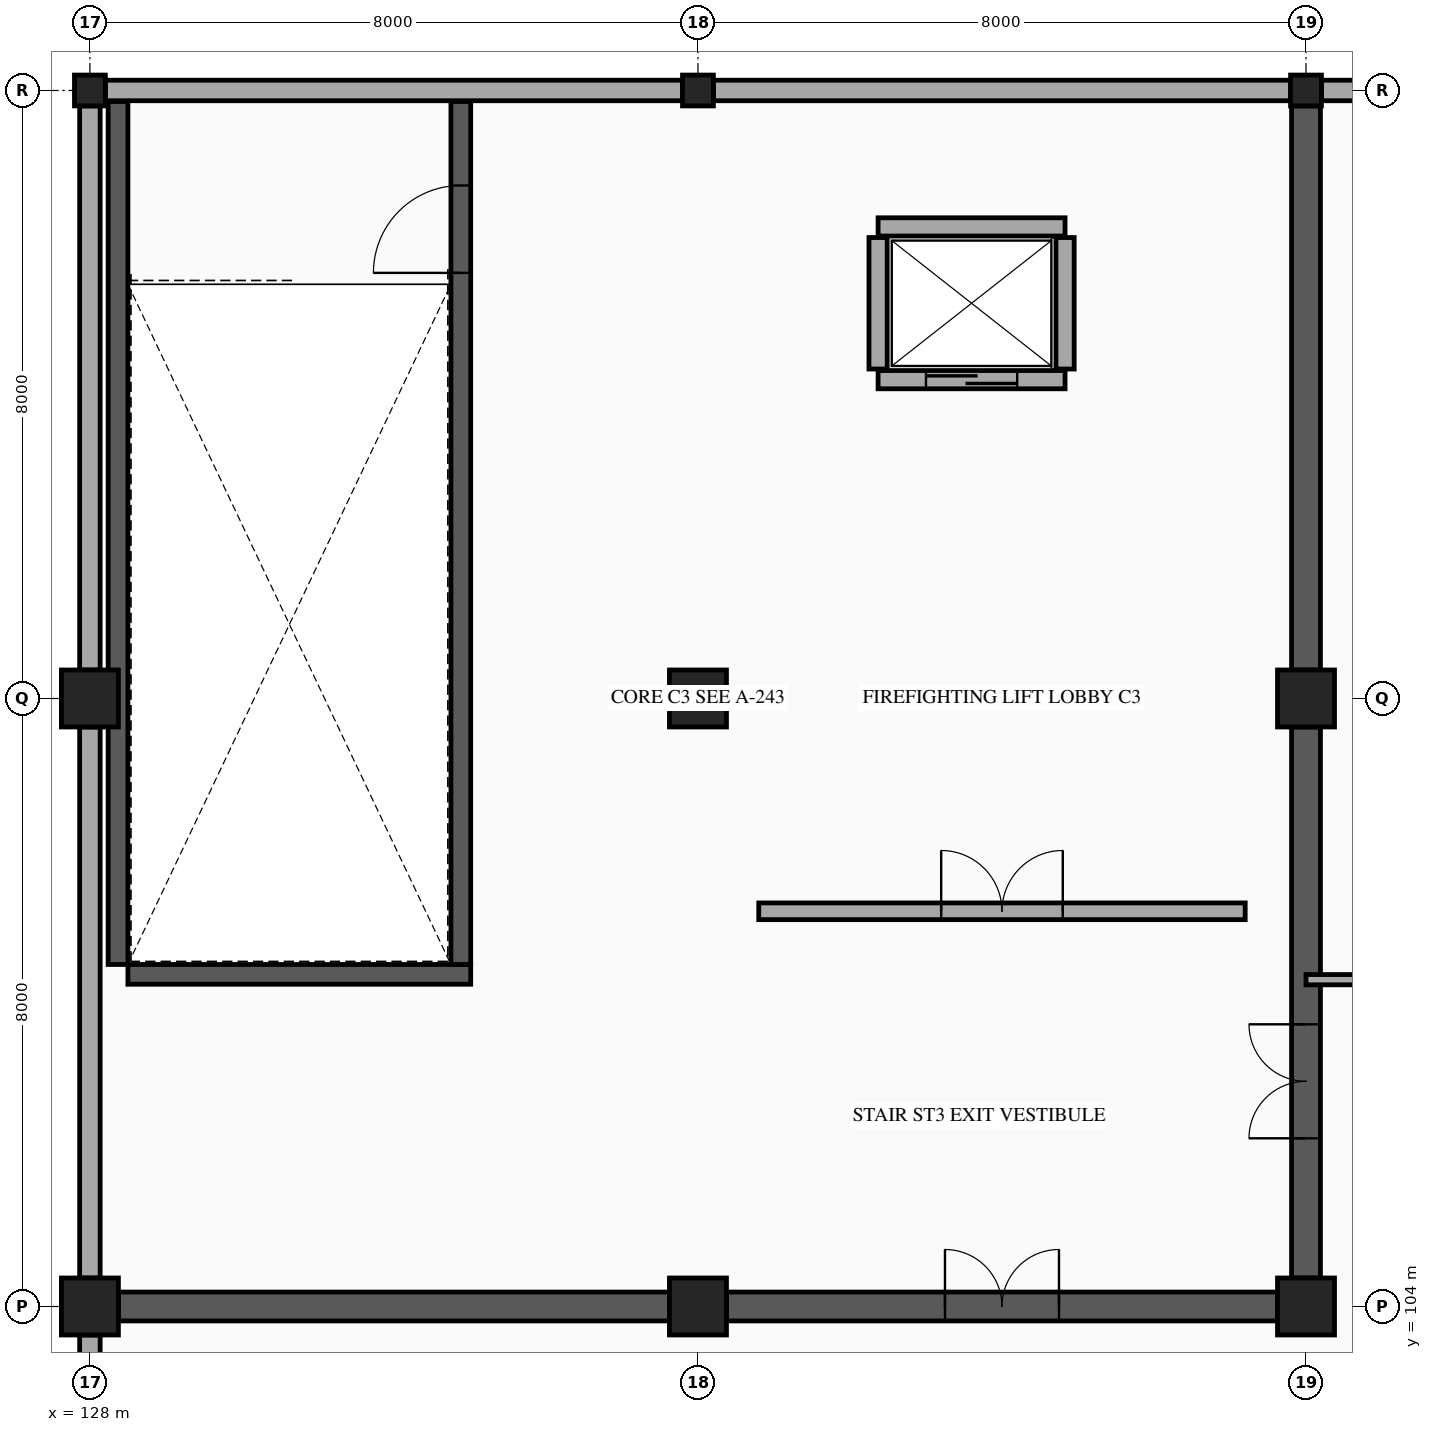
"""IFC4 building model, lengths in metres.
Left out: names, types, materials, properties, quantities, classifications, styles, units other than length and angle.
Written with IfcOpenShell. Run it as: python <this file> out.ifc"""

import sys

from ifc_helpers import new_model, si_unit, direction, frame, frame_2d, origin, origin_2d, place, context, subcontext, project, spatial, rectangle, hollow_rectangle, extrude, element, fill, save


model = new_model("IFC4")
c1 = context("Model", 3, precision=1e-05, world=origin(), true_north=direction((0.0, 1.0)))
c2 = subcontext(c1, "Body", "Model", "MODEL_VIEW")
j1 = project(units=[si_unit("LENGTHUNIT", "METRE"), si_unit("PLANEANGLEUNIT", "RADIAN")], contexts=[c1])
p1 = place(None, origin())
s1 = spatial("IfcSite", under=j1, at=p1, CompositionType="ELEMENT")
p2 = place(p1, origin())
s2 = spatial("IfcBuilding", under=s1, at=p2, CompositionType="ELEMENT")
p3 = place(p2, frame((0.0, 0.0, 32.9)))
s3 = spatial("IfcBuildingStorey", under=s2, at=p3, CompositionType="ELEMENT", Elevation=32.9)
for number, where, z_axis, x_axis in (
    (1, (128.0, 104.0, 0.0), (0.0, 0.0, 1.0), (1.0, 0.0, 0.0)),
    (2, (128.0, 112.0, 0.0), (0.0, 0.0, 1.0), (1.0, 0.0, 0.0)),
):
    element("IfcColumn", number, at=place(p3, frame(where, z_axis=z_axis, x_axis=x_axis)), inside=s3, PredefinedType="COLUMN", context=c2, shape_type="SweptSolid", body=[
        extrude(rectangle(XDim=0.75, YDim=0.75, at=origin_2d()), origin(), (0.0, 0.0, 1.0), 4.6),
    ])
p4 = place(p3, frame((128.0, 120.0, 0.0), z_axis=(0.0, 0.0, 1.0), x_axis=(1.0, 0.0, 0.0)))
e3 = element("IfcColumn", 3, at=p4, inside=s3, PredefinedType="COLUMN", context=c2, shape_type="SweptSolid", body=[
    extrude(hollow_rectangle(XDim=0.406, YDim=0.406, WallThickness=0.015, InnerFilletRadius=0.015, OuterFilletRadius=0.029, at=origin_2d()), origin(), (0.0, 0.0, 1.0), 4.6),
])
for number, where, z_axis, x_axis in (
    (4, (136.0, 104.0, 0.0), (0.0, 0.0, 1.0), (1.0, 0.0, 0.0)),
    (5, (136.0, 112.0, 0.0), (0.0, 0.0, 1.0), (1.0, 0.0, 0.0)),
):
    element("IfcColumn", number, at=place(p3, frame(where, z_axis=z_axis, x_axis=x_axis)), inside=s3, PredefinedType="COLUMN", context=c2, shape_type="SweptSolid", body=[
        extrude(rectangle(XDim=0.75, YDim=0.75, at=origin_2d()), origin(), (0.0, 0.0, 1.0), 4.6),
    ])
p5 = place(p3, frame((136.0, 120.0, 0.0), z_axis=(0.0, 0.0, 1.0), x_axis=(1.0, 0.0, 0.0)))
e6 = element("IfcColumn", 6, at=p5, inside=s3, PredefinedType="COLUMN", context=c2, shape_type="SweptSolid", body=[
    extrude(hollow_rectangle(XDim=0.406, YDim=0.406, WallThickness=0.015, InnerFilletRadius=0.015, OuterFilletRadius=0.029, at=origin_2d()), origin(), (0.0, 0.0, 1.0), 4.6),
])
for number, where, z_axis, x_axis in (
    (7, (144.0, 104.0, 0.0), (0.0, 0.0, 1.0), (1.0, 0.0, 0.0)),
    (8, (144.0, 112.0, 0.0), (0.0, 0.0, 1.0), (1.0, 0.0, 0.0)),
):
    element("IfcColumn", number, at=place(p3, frame(where, z_axis=z_axis, x_axis=x_axis)), inside=s3, PredefinedType="COLUMN", context=c2, shape_type="SweptSolid", body=[
        extrude(rectangle(XDim=0.75, YDim=0.75, at=origin_2d()), origin(), (0.0, 0.0, 1.0), 4.6),
    ])
p6 = place(p3, frame((144.0, 120.0, 0.0), z_axis=(0.0, 0.0, 1.0), x_axis=(1.0, 0.0, 0.0)))
e9 = element("IfcColumn", 9, at=p6, inside=s3, PredefinedType="COLUMN", context=c2, shape_type="SweptSolid", body=[
    extrude(hollow_rectangle(XDim=0.406, YDim=0.406, WallThickness=0.015, InnerFilletRadius=0.015, OuterFilletRadius=0.029, at=origin_2d()), origin(), (0.0, 0.0, 1.0), 4.6),
])
p7 = place(p3, frame((128.0, 96.375, 0.0), z_axis=(0.0, 0.0, 1.0), x_axis=(0.0, 1.0, 0.0)))
e10 = element("IfcWall", 10, at=p7, inside=s3, PredefinedType="STANDARD", context=c2, shape_type="SweptSolid", body=[
    extrude(rectangle(XDim=7.25, YDim=0.27, at=frame_2d((3.625, 0.0))), origin(), (0.0, 0.0, 1.0), 3.58),
])
p8 = place(p7, frame((2.85, 0.0, 0.8)))
e11 = element("IfcOpeningElement", 11, at=p8, cuts=e10, PredefinedType="OPENING", context=c2, shape_type="SweptSolid", body=[
    extrude(rectangle(XDim=1.55, YDim=1.4, at=frame_2d((0.775, 0.7))), frame((0.0, 0.145, 0.0), z_axis=(0.0, -1.0, 0.0), x_axis=(1.0, 0.0, 0.0)), (0.0, 0.0, 1.0), 0.29),
])
p9 = place(p3, frame((128.0, 104.375, 0.0), z_axis=(0.0, 0.0, 1.0), x_axis=(0.0, 1.0, 0.0)))
e12 = element("IfcWall", 12, at=p9, inside=s3, PredefinedType="STANDARD", context=c2, shape_type="SweptSolid", body=[
    extrude(rectangle(XDim=7.25, YDim=0.27, at=frame_2d((3.625, 0.0))), origin(), (0.0, 0.0, 1.0), 3.58),
])
p10 = place(p3, frame((128.0, 112.375, 0.0), z_axis=(0.0, 0.0, 1.0), x_axis=(0.0, 1.0, 0.0)))
e13 = element("IfcWall", 13, at=p10, inside=s3, PredefinedType="STANDARD", context=c2, shape_type="SweptSolid", body=[
    extrude(rectangle(XDim=7.422, YDim=0.27, at=frame_2d((3.711, 0.0))), origin(), (0.0, 0.0, 1.0), 3.58),
])
for number, where, z_axis, x_axis in (
    (14, (128.203, 120.0, 0.0), (0.0, 0.0, 1.0), (1.0, 0.0, 0.0)),
    (15, (136.203, 120.0, 0.0), (0.0, 0.0, 1.0), (1.0, 0.0, 0.0)),
):
    element("IfcWall", number, at=place(p3, frame(where, z_axis=z_axis, x_axis=x_axis)), inside=s3, PredefinedType="STANDARD", context=c2, shape_type="SweptSolid", body=[
        extrude(rectangle(XDim=7.594, YDim=0.27, at=frame_2d((3.797, 0.0))), origin(), (0.0, 0.0, 1.0), 3.58),
    ])
p11 = place(p3, frame((144.203, 120.0, 0.0), z_axis=(0.0, 0.0, 1.0), x_axis=(1.0, 0.0, 0.0)))
e16 = element("IfcWall", 16, at=p11, inside=s3, PredefinedType="STANDARD", context=c2, shape_type="SweptSolid", body=[
    extrude(rectangle(XDim=7.594, YDim=0.27, at=frame_2d((3.797, 0.0))), origin(), (0.0, 0.0, 1.0), 3.58),
])
p12 = place(p11, frame((3.022, 0.0, 0.8)))
e17 = element("IfcOpeningElement", 17, at=p12, cuts=e16, PredefinedType="OPENING", context=c2, shape_type="SweptSolid", body=[
    extrude(rectangle(XDim=1.55, YDim=1.4, at=frame_2d((0.775, 0.7))), frame((0.0, 0.145, 0.0), z_axis=(0.0, -1.0, 0.0), x_axis=(1.0, 0.0, 0.0)), (0.0, 0.0, 1.0), 0.29),
])
p13 = place(p3, frame((128.5, 108.37, 0.0), z_axis=(0.0, 0.0, 1.0), x_axis=(1.0, 0.0, 0.0)))
e18 = element("IfcWall", 18, at=p13, inside=s3, PredefinedType="SHEAR", context=c2, shape_type="SweptSolid", body=[
    extrude(rectangle(XDim=4.51, YDim=0.26, at=frame_2d((2.255, 0.0))), origin(), (0.0, 0.0, 1.0), 4.38),
])
p14 = place(p3, frame((128.37, 108.5, 0.0), z_axis=(0.0, 0.0, 1.0), x_axis=(0.0, 1.0, 0.0)))
e19 = element("IfcWall", 19, at=p14, inside=s3, PredefinedType="SHEAR", context=c2, shape_type="SweptSolid", body=[
    extrude(rectangle(XDim=11.355, YDim=0.26, at=frame_2d((5.677, 0.0))), origin(), (0.0, 0.0, 1.0), 4.38),
])
p15 = place(p3, frame((132.88, 108.5, 0.0), z_axis=(0.0, 0.0, 1.0), x_axis=(0.0, 1.0, 0.0)))
e20 = element("IfcWall", 20, at=p15, inside=s3, PredefinedType="SHEAR", context=c2, shape_type="SweptSolid", body=[
    extrude(rectangle(XDim=11.355, YDim=0.26, at=frame_2d((5.677, 0.0))), origin(), (0.0, 0.0, 1.0), 4.38),
])
p16 = place(p15, frame((9.1, 0.0, 0.0)))
e21 = element("IfcOpeningElement", 21, at=p16, cuts=e20, PredefinedType="OPENING", context=c2, shape_type="SweptSolid", body=[
    extrude(rectangle(XDim=1.15, YDim=2.15, at=frame_2d((0.575, 1.075))), frame((0.0, 0.14, 0.0), z_axis=(0.0, -1.0, 0.0), x_axis=(1.0, 0.0, 0.0)), (0.0, 0.0, 1.0), 0.28),
])
p17 = place(p3, frame((128.375, 104.0, 0.0), z_axis=(0.0, 0.0, 1.0), x_axis=(1.0, 0.0, 0.0)))
e22 = element("IfcWall", 22, at=p17, inside=s3, PredefinedType="SHEAR", context=c2, shape_type="SweptSolid", body=[
    extrude(rectangle(XDim=7.25, YDim=0.38, at=frame_2d((3.625, 0.0))), origin(), (0.0, 0.0, 1.0), 4.38),
])
p18 = place(p3, frame((136.375, 104.0, 0.0), z_axis=(0.0, 0.0, 1.0), x_axis=(1.0, 0.0, 0.0)))
e23 = element("IfcWall", 23, at=p18, inside=s3, PredefinedType="SHEAR", context=c2, shape_type="SweptSolid", body=[
    extrude(rectangle(XDim=7.25, YDim=0.38, at=frame_2d((3.625, 0.0))), origin(), (0.0, 0.0, 1.0), 4.38),
])
p19 = place(p18, frame((2.875, 0.0, 0.0)))
e24 = element("IfcOpeningElement", 24, at=p19, cuts=e23, PredefinedType="OPENING", context=c2, shape_type="SweptSolid", body=[
    extrude(rectangle(XDim=1.5, YDim=2.15, at=frame_2d((0.75, 1.075))), frame((0.0, 0.2, 0.0), z_axis=(0.0, -1.0, 0.0), x_axis=(1.0, 0.0, 0.0)), (0.0, 0.0, 1.0), 0.4),
])
p20 = place(p3, frame((144.0, 104.375, 0.0), z_axis=(0.0, 0.0, 1.0), x_axis=(0.0, 1.0, 0.0)))
e25 = element("IfcWall", 25, at=p20, inside=s3, PredefinedType="SHEAR", context=c2, shape_type="SweptSolid", body=[
    extrude(rectangle(XDim=7.25, YDim=0.38, at=frame_2d((3.625, 0.0))), origin(), (0.0, 0.0, 1.0), 4.38),
])
p21 = place(p20, frame((1.838, 0.0, 0.0)))
e26 = element("IfcOpeningElement", 26, at=p21, cuts=e25, PredefinedType="OPENING", context=c2, shape_type="SweptSolid", body=[
    extrude(rectangle(XDim=1.5, YDim=2.15, at=frame_2d((0.75, 1.075))), frame((0.0, 0.2, 0.0), z_axis=(0.0, -1.0, 0.0), x_axis=(1.0, 0.0, 0.0)), (0.0, 0.0, 1.0), 0.4),
])
p22 = place(p3, frame((144.0, 112.375, 0.0), z_axis=(0.0, 0.0, 1.0), x_axis=(0.0, 1.0, 0.0)))
e27 = element("IfcWall", 27, at=p22, inside=s3, PredefinedType="SHEAR", context=c2, shape_type="SweptSolid", body=[
    extrude(rectangle(XDim=7.422, YDim=0.38, at=frame_2d((3.711, 0.0))), origin(), (0.0, 0.0, 1.0), 4.38),
])
p23 = place(p3, frame((138.37, 116.195, 0.0), z_axis=(0.0, 0.0, 1.0), x_axis=(1.0, 0.0, 0.0)))
e28 = element("IfcWall", 28, at=p23, inside=s3, PredefinedType="PARTITIONING", context=c2, shape_type="SweptSolid", body=[
    extrude(rectangle(XDim=2.46, YDim=0.24, at=frame_2d((1.23, 0.0))), origin(), (0.0, 0.0, 1.0), 4.38),
])
p24 = place(p23, frame((0.63, 0.0, 0.0)))
e29 = element("IfcOpeningElement", 29, at=p24, cuts=e28, PredefinedType="OPENING", context=c2, shape_type="SweptSolid", body=[
    extrude(rectangle(XDim=1.2, YDim=2.15, at=frame_2d((0.6, 1.075))), frame((0.0, 0.13, 0.0), z_axis=(0.0, -1.0, 0.0), x_axis=(1.0, 0.0, 0.0)), (0.0, 0.0, 1.0), 0.26),
])
p25 = place(p3, frame((138.37, 118.205, 0.0), z_axis=(0.0, 0.0, 1.0), x_axis=(1.0, 0.0, 0.0)))
e30 = element("IfcWall", 30, at=p25, inside=s3, PredefinedType="PARTITIONING", context=c2, shape_type="SweptSolid", body=[
    extrude(rectangle(XDim=2.46, YDim=0.24, at=frame_2d((1.23, 0.0))), origin(), (0.0, 0.0, 1.0), 4.38),
])
for number, where, z_axis, x_axis in (
    (31, (138.37, 116.335, 0.0), (0.0, 0.0, 1.0), (0.0, 1.0, 0.0)),
    (32, (140.83, 116.335, 0.0), (0.0, 0.0, 1.0), (0.0, 1.0, 0.0)),
):
    element("IfcWall", number, at=place(p3, frame(where, z_axis=z_axis, x_axis=x_axis)), inside=s3, PredefinedType="PARTITIONING", context=c2, shape_type="SweptSolid", body=[
        extrude(rectangle(XDim=1.73, YDim=0.24, at=frame_2d((0.865, 0.0))), origin(), (0.0, 0.0, 1.0), 4.38),
    ])
p26 = place(p3, frame((136.8, 109.2, 0.0), z_axis=(0.0, 0.0, 1.0), x_axis=(1.0, 0.0, 0.0)))
e33 = element("IfcWall", 33, at=p26, inside=s3, PredefinedType="PARTITIONING", context=c2, shape_type="SweptSolid", body=[
    extrude(rectangle(XDim=6.4, YDim=0.22, at=frame_2d((3.2, 0.0))), origin(), (0.0, 0.0, 1.0), 3.58),
])
p27 = place(p26, frame((2.4, 0.0, 0.0)))
e34 = element("IfcOpeningElement", 34, at=p27, cuts=e33, PredefinedType="OPENING", context=c2, shape_type="SweptSolid", body=[
    extrude(rectangle(XDim=1.6, YDim=2.15, at=frame_2d((0.8, 1.075))), frame((0.0, 0.12, 0.0), z_axis=(0.0, -1.0, 0.0), x_axis=(1.0, 0.0, 0.0)), (0.0, 0.0, 1.0), 0.24),
])
p28 = place(p3, frame((144.0, 108.3, 0.0), z_axis=(0.0, 0.0, 1.0), x_axis=(1.0, 0.0, 0.0)))
e35 = element("IfcWall", 35, at=p28, inside=s3, PredefinedType="PARTITIONING", context=c2, shape_type="SweptSolid", body=[
    extrude(rectangle(XDim=19.4, YDim=0.135, at=frame_2d((9.7, 0.0))), origin(), (0.0, 0.0, 1.0), 3.58),
])
p29 = place(p28, frame((3.568, 0.0, 0.0)))
e36 = element("IfcOpeningElement", 36, at=p29, cuts=e35, PredefinedType="OPENING", context=c2, shape_type="SweptSolid", body=[
    extrude(rectangle(XDim=1.0, YDim=2.15, at=frame_2d((0.5, 1.075))), frame((0.0, 0.077, 0.0), z_axis=(0.0, -1.0, 0.0), x_axis=(1.0, 0.0, 0.0)), (0.0, 0.0, 1.0), 0.155),
])
p30 = place(p16, origin())
e37 = element("IfcDoor", 37, at=p30, inside=s3, OperationType="SINGLE_SWING_LEFT", PredefinedType="DOOR", context=c2, shape_type="SweptSolid", body=[
    extrude(rectangle(XDim=1.15, YDim=2.15, at=frame_2d((0.575, 1.075))), frame((0.0, 0.025, 0.0), z_axis=(0.0, -1.0, 0.0), x_axis=(1.0, 0.0, 0.0)), (0.0, 0.0, 1.0), 0.05),
])
fill(e21, e37)
p31 = place(p19, origin())
e38 = element("IfcDoor", 38, at=p31, inside=s3, OperationType="DOUBLE_DOOR_SINGLE_SWING", PredefinedType="DOOR", context=c2, shape_type="SweptSolid", body=[
    extrude(rectangle(XDim=1.5, YDim=2.15, at=frame_2d((0.75, 1.075))), frame((0.0, 0.025, 0.0), z_axis=(0.0, -1.0, 0.0), x_axis=(1.0, 0.0, 0.0)), (0.0, 0.0, 1.0), 0.05),
])
fill(e24, e38)
p32 = place(p21, origin())
e39 = element("IfcDoor", 39, at=p32, inside=s3, OperationType="DOUBLE_DOOR_SINGLE_SWING", PredefinedType="DOOR", context=c2, shape_type="SweptSolid", body=[
    extrude(rectangle(XDim=1.5, YDim=2.15, at=frame_2d((0.75, 1.075))), frame((0.0, 0.025, 0.0), z_axis=(0.0, -1.0, 0.0), x_axis=(1.0, 0.0, 0.0)), (0.0, 0.0, 1.0), 0.05),
])
fill(e26, e39)
p33 = place(p24, origin())
e40 = element("IfcDoor", 40, at=p33, inside=s3, OperationType="SLIDING_TO_LEFT", PredefinedType="DOOR", context=c2, shape_type="SweptSolid", body=[
    extrude(rectangle(XDim=1.2, YDim=2.15, at=frame_2d((0.6, 1.075))), frame((0.0, 0.025, 0.0), z_axis=(0.0, -1.0, 0.0), x_axis=(1.0, 0.0, 0.0)), (0.0, 0.0, 1.0), 0.05),
])
fill(e29, e40)
p34 = place(p27, origin())
e41 = element("IfcDoor", 41, at=p34, inside=s3, OperationType="DOUBLE_DOOR_SINGLE_SWING", PredefinedType="DOOR", context=c2, shape_type="SweptSolid", body=[
    extrude(rectangle(XDim=1.6, YDim=2.15, at=frame_2d((0.8, 1.075))), frame((0.0, 0.025, 0.0), z_axis=(0.0, -1.0, 0.0), x_axis=(1.0, 0.0, 0.0)), (0.0, 0.0, 1.0), 0.05),
])
fill(e34, e41)
save(model, sys.argv[1])
